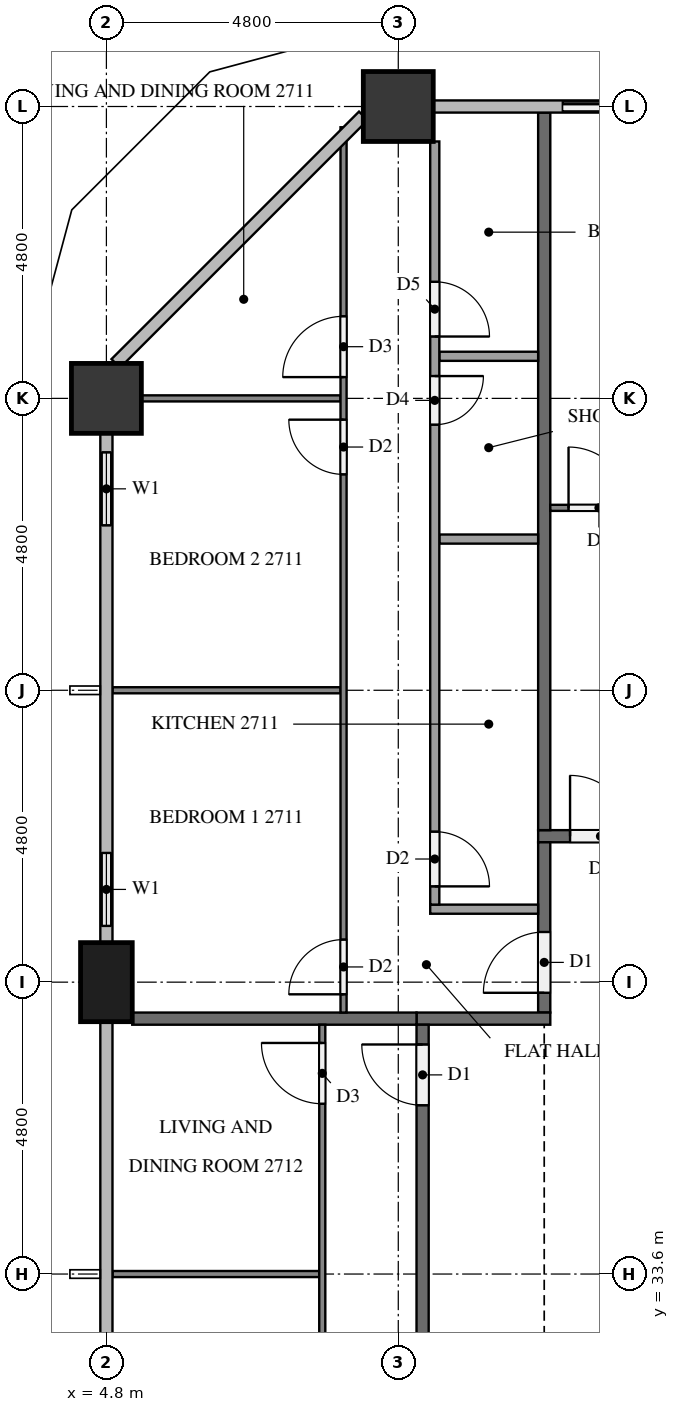
"""IFC4 building model, lengths in metres.
Left out: names, types, materials, properties, quantities, classifications, styles, units other than length and angle.
Written with IfcOpenShell. Run it as: python <this file> out.ifc"""

import sys

from ifc_helpers import new_model, si_unit, direction, frame, frame_2d, origin, origin_2d, place, context, subcontext, project, spatial, rectangle, extrude, element, fill, save


model = new_model("IFC4")
c1 = context("Model", 3, precision=1e-05, world=origin(), true_north=direction((0.0, 1.0)))
c2 = subcontext(c1, "Body", "Model", "MODEL_VIEW")
j1 = project(units=[si_unit("LENGTHUNIT", "METRE"), si_unit("PLANEANGLEUNIT", "RADIAN")], contexts=[c1])
p1 = place(None, origin())
s1 = spatial("IfcSite", under=j1, at=p1, CompositionType="ELEMENT")
p2 = place(p1, origin())
s2 = spatial("IfcBuilding", under=s1, at=p2, CompositionType="ELEMENT")
p3 = place(p2, frame((0.0, 0.0, 106.7)))
s3 = spatial("IfcBuildingStorey", under=s2, at=p3, CompositionType="ELEMENT", Elevation=106.7)
for number, where, z_axis, x_axis in (
    (1, (9.6, 52.8, 0.0), (0.0, 0.0, 1.0), (1.0, 0.0, 0.0)),
    (2, (4.8, 48.0, 0.0), (0.0, 0.0, 1.0), (1.0, 0.0, 0.0)),
):
    element("IfcColumn", number, at=place(p3, frame(where, z_axis=z_axis, x_axis=x_axis)), inside=s3, PredefinedType="COLUMN", context=c2, shape_type="SweptSolid", body=[
        extrude(rectangle(XDim=1.15, YDim=1.15, at=origin_2d()), origin(), (0.0, 0.0, 1.0), 3.2),
    ])
p4 = place(p3, frame((4.8, 38.4, 0.0), z_axis=(0.0, 0.0, 1.0), x_axis=(0.0, 1.0, 0.0)))
e3 = element("IfcColumn", 3, at=p4, inside=s3, PredefinedType="COLUMN", context=c2, shape_type="SweptSolid", body=[
    extrude(rectangle(XDim=1.3, YDim=0.85, at=origin_2d()), origin(), (0.0, 0.0, 1.0), 3.2),
])
p5 = place(p3, frame((14.4, 52.8, 0.0), z_axis=(0.0, 0.0, 1.0), x_axis=(-1.0, 0.0, 0.0)))
e4 = element("IfcWall", 4, at=p5, inside=s3, PredefinedType="SOLIDWALL", context=c2, shape_type="SweptSolid", body=[
    extrude(rectangle(XDim=2.4, YDim=0.15, at=frame_2d((1.2, 0.0))), origin(), (0.0, 0.0, 1.0), 3.2),
])
p6 = place(p5, frame((0.3, 0.0, 0.0)))
e5 = element("IfcOpeningElement", 5, at=p6, cuts=e4, PredefinedType="OPENING", context=c2, shape_type="SweptSolid", body=[
    extrude(rectangle(XDim=1.8, YDim=2.4, at=frame_2d((0.9, 1.2))), frame((0.0, 0.085, 0.0), z_axis=(0.0, -1.0, 0.0), x_axis=(1.0, 0.0, 0.0)), (0.0, 0.0, 1.0), 0.17),
])
p7 = place(p3, frame((4.8, 47.425, 0.0), z_axis=(0.0, 0.0, 1.0), x_axis=(0.0, -1.0, 0.0)))
e6 = element("IfcWall", 6, at=p7, inside=s3, PredefinedType="SOLIDWALL", context=c2, shape_type="SweptSolid", body=[
    extrude(rectangle(XDim=1.825, YDim=0.15, at=frame_2d((0.913, 0.0))), origin(), (0.0, 0.0, 1.0), 3.2),
])
p8 = place(p7, frame((0.312, 0.0, 0.9)))
e7 = element("IfcOpeningElement", 7, at=p8, cuts=e6, PredefinedType="OPENING", context=c2, shape_type="SweptSolid", body=[
    extrude(rectangle(XDim=1.2, YDim=1.4, at=frame_2d((0.6, 0.7))), frame((0.0, 0.085, 0.0), z_axis=(0.0, -1.0, 0.0), x_axis=(1.0, 0.0, 0.0)), (0.0, 0.0, 1.0), 0.17),
])
p9 = place(p3, frame((4.8, 40.8, 0.0), z_axis=(0.0, 0.0, 1.0), x_axis=(0.0, -1.0, 0.0)))
e8 = element("IfcWall", 8, at=p9, inside=s3, PredefinedType="SOLIDWALL", context=c2, shape_type="SweptSolid", body=[
    extrude(rectangle(XDim=1.75, YDim=0.15, at=frame_2d((0.875, 0.0))), origin(), (0.0, 0.0, 1.0), 3.2),
])
p10 = place(p9, frame((0.275, 0.0, 0.9)))
e9 = element("IfcOpeningElement", 9, at=p10, cuts=e8, PredefinedType="OPENING", context=c2, shape_type="SweptSolid", body=[
    extrude(rectangle(XDim=1.2, YDim=1.4, at=frame_2d((0.6, 0.7))), frame((0.0, 0.085, 0.0), z_axis=(0.0, -1.0, 0.0), x_axis=(1.0, 0.0, 0.0)), (0.0, 0.0, 1.0), 0.17),
])
p11 = place(p3, frame((11.9, 40.8, 0.0), z_axis=(0.0, 0.0, 1.0), x_axis=(1.0, 0.0, 0.0)))
e10 = element("IfcWall", 10, at=p11, inside=s3, PredefinedType="PARTITIONING", context=c2, shape_type="SweptSolid", body=[
    extrude(rectangle(XDim=38.6, YDim=0.2, at=frame_2d((19.3, 0.0))), origin(), (0.0, 0.0, 1.0), 3.2),
])
p12 = place(p11, frame((22.125, 0.0, 0.0)))
e11 = element("IfcOpeningElement", 11, at=p12, cuts=e10, PredefinedType="OPENING", context=c2, shape_type="SweptSolid", body=[
    extrude(rectangle(XDim=1.0, YDim=2.1, at=frame_2d((0.5, 1.05))), frame((0.0, 0.11, 0.0), z_axis=(0.0, -1.0, 0.0), x_axis=(1.0, 0.0, 0.0)), (0.0, 0.0, 1.0), 0.22),
])
p13 = place(p11, frame((20.275, 0.0, 0.0)))
e12 = element("IfcOpeningElement", 12, at=p13, cuts=e10, PredefinedType="OPENING", context=c2, shape_type="SweptSolid", body=[
    extrude(rectangle(XDim=1.0, YDim=2.1, at=frame_2d((0.5, 1.05))), frame((0.0, 0.11, 0.0), z_axis=(0.0, -1.0, 0.0), x_axis=(1.0, 0.0, 0.0)), (0.0, 0.0, 1.0), 0.22),
])
p14 = place(p11, frame((0.525, 0.0, 0.0)))
e13 = element("IfcOpeningElement", 13, at=p14, cuts=e10, PredefinedType="OPENING", context=c2, shape_type="SweptSolid", body=[
    extrude(rectangle(XDim=1.0, YDim=2.1, at=frame_2d((0.5, 1.05))), frame((0.0, 0.11, 0.0), z_axis=(0.0, -1.0, 0.0), x_axis=(1.0, 0.0, 0.0)), (0.0, 0.0, 1.0), 0.22),
])
p15 = place(p3, frame((12.0, 37.9, 0.0), z_axis=(0.0, 0.0, 1.0), x_axis=(0.0, 1.0, 0.0)))
e14 = element("IfcWall", 14, at=p15, inside=s3, PredefinedType="PARTITIONING", context=c2, shape_type="SweptSolid", body=[
    extrude(rectangle(XDim=2.8, YDim=0.2, at=frame_2d((1.4, 0.0))), origin(), (0.0, 0.0, 1.0), 3.2),
])
p16 = place(p15, frame((0.325, 0.0, 0.0)))
e15 = element("IfcOpeningElement", 15, at=p16, cuts=e14, PredefinedType="OPENING", context=c2, shape_type="SweptSolid", body=[
    extrude(rectangle(XDim=1.0, YDim=2.1, at=frame_2d((0.5, 1.05))), frame((0.0, 0.11, 0.0), z_axis=(0.0, -1.0, 0.0), x_axis=(1.0, 0.0, 0.0)), (0.0, 0.0, 1.0), 0.22),
])
p17 = place(p3, frame((12.1, 37.8, 0.0), z_axis=(0.0, 0.0, 1.0), x_axis=(-1.0, 0.0, 0.0)))
e16 = element("IfcWall", 16, at=p17, inside=s3, PredefinedType="PARTITIONING", context=c2, shape_type="SweptSolid", body=[
    extrude(rectangle(XDim=2.2, YDim=0.2, at=frame_2d((1.1, 0.0))), origin(), (0.0, 0.0, 1.0), 3.2),
])
p18 = place(p3, frame((10.0, 15.1, 0.0), z_axis=(0.0, 0.0, 1.0), x_axis=(0.0, 1.0, 0.0)))
e17 = element("IfcWall", 17, at=p18, inside=s3, PredefinedType="PARTITIONING", context=c2, shape_type="SweptSolid", body=[
    extrude(rectangle(XDim=22.6, YDim=0.2, at=frame_2d((11.3, 0.0))), origin(), (0.0, 0.0, 1.0), 3.2),
])
p19 = place(p18, frame((21.275, 0.0, 0.0)))
e18 = element("IfcOpeningElement", 18, at=p19, cuts=e17, PredefinedType="OPENING", context=c2, shape_type="SweptSolid", body=[
    extrude(rectangle(XDim=1.0, YDim=2.1, at=frame_2d((0.5, 1.05))), frame((0.0, 0.11, 0.0), z_axis=(0.0, -1.0, 0.0), x_axis=(1.0, 0.0, 0.0)), (0.0, 0.0, 1.0), 0.22),
])
p20 = place(p18, frame((7.475, 0.0, 0.0)))
e19 = element("IfcOpeningElement", 19, at=p20, cuts=e17, PredefinedType="OPENING", context=c2, shape_type="SweptSolid", body=[
    extrude(rectangle(XDim=1.0, YDim=2.1, at=frame_2d((0.5, 1.05))), frame((0.0, 0.11, 0.0), z_axis=(0.0, -1.0, 0.0), x_axis=(1.0, 0.0, 0.0)), (0.0, 0.0, 1.0), 0.22),
])
p21 = place(p3, frame((12.0, 52.7, 0.0), z_axis=(0.0, 0.0, 1.0), x_axis=(0.0, -1.0, 0.0)))
e20 = element("IfcWall", 20, at=p21, inside=s3, PredefinedType="PARTITIONING", context=c2, shape_type="SweptSolid", body=[
    extrude(rectangle(XDim=11.8, YDim=0.2, at=frame_2d((5.9, 0.0))), origin(), (0.0, 0.0, 1.0), 3.2),
])
p22 = place(p3, frame((5.225, 37.8, 0.0), z_axis=(0.0, 0.0, 1.0), x_axis=(1.0, 0.0, 0.0)))
e21 = element("IfcWall", 21, at=p22, inside=s3, PredefinedType="PARTITIONING", context=c2, shape_type="SweptSolid", body=[
    extrude(rectangle(XDim=4.675, YDim=0.2, at=frame_2d((2.337, 0.0))), origin(), (0.0, 0.0, 1.0), 3.2),
])
p23 = place(p3, frame((12.1, 46.2, 0.0), z_axis=(0.0, 0.0, 1.0), x_axis=(1.0, 0.0, 0.0)))
e22 = element("IfcWall", 22, at=p23, inside=s3, PredefinedType="PARTITIONING", context=c2, shape_type="SweptSolid", body=[
    extrude(rectangle(XDim=9.4, YDim=0.1, at=frame_2d((4.7, 0.0))), origin(), (0.0, 0.0, 1.0), 3.2),
])
p24 = place(p23, frame((0.3, 0.0, 0.0)))
e23 = element("IfcOpeningElement", 23, at=p24, cuts=e22, PredefinedType="OPENING", context=c2, shape_type="SweptSolid", body=[
    extrude(rectangle(XDim=1.0, YDim=2.1, at=frame_2d((0.5, 1.05))), frame((0.0, 0.06, 0.0), z_axis=(0.0, -1.0, 0.0), x_axis=(1.0, 0.0, 0.0)), (0.0, 0.0, 1.0), 0.12),
])
p25 = place(p23, frame((8.2, 0.0, 0.0)))
e24 = element("IfcOpeningElement", 24, at=p25, cuts=e22, PredefinedType="OPENING", context=c2, shape_type="SweptSolid", body=[
    extrude(rectangle(XDim=0.9, YDim=2.1, at=frame_2d((0.45, 1.05))), frame((0.0, 0.06, 0.0), z_axis=(0.0, -1.0, 0.0), x_axis=(1.0, 0.0, 0.0)), (0.0, 0.0, 1.0), 0.12),
])
p26 = place(p3, frame((8.65, 43.2, 0.0), z_axis=(0.0, 0.0, 1.0), x_axis=(-1.0, 0.0, 0.0)))
e25 = element("IfcWall", 25, at=p26, inside=s3, PredefinedType="PARTITIONING", context=c2, shape_type="SweptSolid", body=[
    extrude(rectangle(XDim=3.75, YDim=0.1, at=frame_2d((1.875, 0.0))), origin(), (0.0, 0.0, 1.0), 3.2),
])
p27 = place(p3, frame((8.65, 48.0, 0.0), z_axis=(0.0, 0.0, 1.0), x_axis=(-1.0, 0.0, 0.0)))
e26 = element("IfcWall", 26, at=p27, inside=s3, PredefinedType="PARTITIONING", context=c2, shape_type="SweptSolid", body=[
    extrude(rectangle(XDim=3.275, YDim=0.1, at=frame_2d((1.637, 0.0))), origin(), (0.0, 0.0, 1.0), 3.2),
])
p28 = place(p3, frame((8.7, 37.9, 0.0), z_axis=(0.0, 0.0, 1.0), x_axis=(0.0, 1.0, 0.0)))
e27 = element("IfcWall", 27, at=p28, inside=s3, PredefinedType="PARTITIONING", context=c2, shape_type="SweptSolid", body=[
    extrude(rectangle(XDim=14.559, YDim=0.1, at=frame_2d((7.279, 0.0))), origin(), (0.0, 0.0, 1.0), 3.2),
])
p29 = place(p28, frame((0.3, 0.0, 0.0)))
e28 = element("IfcOpeningElement", 28, at=p29, cuts=e27, PredefinedType="OPENING", context=c2, shape_type="SweptSolid", body=[
    extrude(rectangle(XDim=0.9, YDim=2.1, at=frame_2d((0.45, 1.05))), frame((0.0, 0.06, 0.0), z_axis=(0.0, -1.0, 0.0), x_axis=(1.0, 0.0, 0.0)), (0.0, 0.0, 1.0), 0.12),
])
p30 = place(p28, frame((8.85, 0.0, 0.0)))
e29 = element("IfcOpeningElement", 29, at=p30, cuts=e27, PredefinedType="OPENING", context=c2, shape_type="SweptSolid", body=[
    extrude(rectangle(XDim=0.9, YDim=2.1, at=frame_2d((0.45, 1.05))), frame((0.0, 0.06, 0.0), z_axis=(0.0, -1.0, 0.0), x_axis=(1.0, 0.0, 0.0)), (0.0, 0.0, 1.0), 0.12),
])
p31 = place(p28, frame((10.45, 0.0, 0.0)))
e30 = element("IfcOpeningElement", 30, at=p31, cuts=e27, PredefinedType="OPENING", context=c2, shape_type="SweptSolid", body=[
    extrude(rectangle(XDim=1.0, YDim=2.1, at=frame_2d((0.5, 1.05))), frame((0.0, 0.06, 0.0), z_axis=(0.0, -1.0, 0.0), x_axis=(1.0, 0.0, 0.0)), (0.0, 0.0, 1.0), 0.12),
])
for number, where, z_axis, x_axis in (
    (31, (11.9, 45.687, 0.0), (0.0, 0.0, 1.0), (-1.0, 0.0, 0.0)),
    (32, (11.9, 48.692, 0.0), (0.0, 0.0, 1.0), (-1.0, 0.0, 0.0)),
):
    element("IfcWall", number, at=place(p3, frame(where, z_axis=z_axis, x_axis=x_axis)), inside=s3, PredefinedType="PARTITIONING", context=c2, shape_type="SweptSolid", body=[
        extrude(rectangle(XDim=1.625, YDim=0.15, at=frame_2d((0.812, 0.0))), origin(), (0.0, 0.0, 1.0), 3.2),
    ])
p32 = place(p3, frame((11.9, 39.6, 0.0), z_axis=(0.0, 0.0, 1.0), x_axis=(-1.0, 0.0, 0.0)))
e33 = element("IfcWall", 33, at=p32, inside=s3, PredefinedType="PARTITIONING", context=c2, shape_type="SweptSolid", body=[
    extrude(rectangle(XDim=1.775, YDim=0.15, at=frame_2d((0.887, 0.0))), origin(), (0.0, 0.0, 1.0), 3.2),
])
p33 = place(p3, frame((10.2, 52.225, 0.0), z_axis=(0.0, 0.0, 1.0), x_axis=(0.0, -1.0, 0.0)))
e34 = element("IfcWall", 34, at=p33, inside=s3, PredefinedType="PARTITIONING", context=c2, shape_type="SweptSolid", body=[
    extrude(rectangle(XDim=12.55, YDim=0.15, at=frame_2d((6.275, 0.0))), origin(), (0.0, 0.0, 1.0), 3.2),
])
p34 = place(p33, frame((11.35, 0.0, 0.0)))
e35 = element("IfcOpeningElement", 35, at=p34, cuts=e34, PredefinedType="OPENING", context=c2, shape_type="SweptSolid", body=[
    extrude(rectangle(XDim=0.9, YDim=2.1, at=frame_2d((0.45, 1.05))), frame((0.0, 0.085, 0.0), z_axis=(0.0, -1.0, 0.0), x_axis=(1.0, 0.0, 0.0)), (0.0, 0.0, 1.0), 0.17),
])
p35 = place(p33, frame((3.858, 0.0, 0.0)))
e36 = element("IfcOpeningElement", 36, at=p35, cuts=e34, PredefinedType="OPENING", context=c2, shape_type="SweptSolid", body=[
    extrude(rectangle(XDim=0.8, YDim=2.1, at=frame_2d((0.4, 1.05))), frame((0.0, 0.085, 0.0), z_axis=(0.0, -1.0, 0.0), x_axis=(1.0, 0.0, 0.0)), (0.0, 0.0, 1.0), 0.17),
])
p36 = place(p33, frame((2.308, 0.0, 0.0)))
e37 = element("IfcOpeningElement", 37, at=p36, cuts=e34, PredefinedType="OPENING", context=c2, shape_type="SweptSolid", body=[
    extrude(rectangle(XDim=0.9, YDim=2.1, at=frame_2d((0.45, 1.05))), frame((0.0, 0.085, 0.0), z_axis=(0.0, -1.0, 0.0), x_axis=(1.0, 0.0, 0.0)), (0.0, 0.0, 1.0), 0.17),
])
p37 = place(p3, frame((8.3, 33.6, 0.0), z_axis=(0.0, 0.0, 1.0), x_axis=(-1.0, 0.0, 0.0)))
e38 = element("IfcWall", 38, at=p37, inside=s3, PredefinedType="PARTITIONING", context=c2, shape_type="SweptSolid", body=[
    extrude(rectangle(XDim=3.4, YDim=0.1, at=frame_2d((1.7, 0.0))), origin(), (0.0, 0.0, 1.0), 3.2),
])
p38 = place(p3, frame((8.35, 24.1, 0.0), z_axis=(0.0, 0.0, 1.0), x_axis=(0.0, 1.0, 0.0)))
e39 = element("IfcWall", 39, at=p38, inside=s3, PredefinedType="PARTITIONING", context=c2, shape_type="SweptSolid", body=[
    extrude(rectangle(XDim=13.6, YDim=0.1, at=frame_2d((6.8, 0.0))), origin(), (0.0, 0.0, 1.0), 3.2),
])
p39 = place(p38, frame((12.3, 0.0, 0.0)))
e40 = element("IfcOpeningElement", 40, at=p39, cuts=e39, PredefinedType="OPENING", context=c2, shape_type="SweptSolid", body=[
    extrude(rectangle(XDim=1.0, YDim=2.1, at=frame_2d((0.5, 1.05))), frame((0.0, 0.06, 0.0), z_axis=(0.0, -1.0, 0.0), x_axis=(1.0, 0.0, 0.0)), (0.0, 0.0, 1.0), 0.12),
])
p40 = place(p38, frame((5.05, 0.0, 0.0)))
e41 = element("IfcOpeningElement", 41, at=p40, cuts=e39, PredefinedType="OPENING", context=c2, shape_type="SweptSolid", body=[
    extrude(rectangle(XDim=0.9, YDim=2.1, at=frame_2d((0.45, 1.05))), frame((0.0, 0.06, 0.0), z_axis=(0.0, -1.0, 0.0), x_axis=(1.0, 0.0, 0.0)), (0.0, 0.0, 1.0), 0.12),
])
p41 = place(p38, frame((3.55, 0.0, 0.0)))
e42 = element("IfcOpeningElement", 42, at=p41, cuts=e39, PredefinedType="OPENING", context=c2, shape_type="SweptSolid", body=[
    extrude(rectangle(XDim=0.8, YDim=2.1, at=frame_2d((0.4, 1.05))), frame((0.0, 0.06, 0.0), z_axis=(0.0, -1.0, 0.0), x_axis=(1.0, 0.0, 0.0)), (0.0, 0.0, 1.0), 0.12),
])
p42 = place(p38, frame((0.3, 0.0, 0.0)))
e43 = element("IfcOpeningElement", 43, at=p42, cuts=e39, PredefinedType="OPENING", context=c2, shape_type="SweptSolid", body=[
    extrude(rectangle(XDim=0.9, YDim=2.1, at=frame_2d((0.45, 1.05))), frame((0.0, 0.06, 0.0), z_axis=(0.0, -1.0, 0.0), x_axis=(1.0, 0.0, 0.0)), (0.0, 0.0, 1.0), 0.12),
])
p43 = place(p6, origin())
e44 = element("IfcDoor", 44, at=p43, inside=s3, OperationType="SLIDING_TO_RIGHT", PredefinedType="DOOR", context=c2, shape_type="SweptSolid", body=[
    extrude(rectangle(XDim=1.8, YDim=2.4, at=frame_2d((0.9, 1.2))), frame((0.0, 0.025, 0.0), z_axis=(0.0, -1.0, 0.0), x_axis=(1.0, 0.0, 0.0)), (0.0, 0.0, 1.0), 0.05),
])
fill(e5, e44)
p44 = place(p8, origin())
e45 = element("IfcWindow", 45, at=p44, inside=s3, PartitioningType="SINGLE_PANEL", PredefinedType="WINDOW", context=c2, shape_type="SweptSolid", body=[
    extrude(rectangle(XDim=1.2, YDim=1.4, at=frame_2d((0.6, 0.7))), frame((0.0, 0.03, 0.0), z_axis=(0.0, -1.0, 0.0), x_axis=(1.0, 0.0, 0.0)), (0.0, 0.0, 1.0), 0.06),
])
fill(e7, e45)
p45 = place(p10, origin())
e46 = element("IfcWindow", 46, at=p45, inside=s3, PartitioningType="SINGLE_PANEL", PredefinedType="WINDOW", context=c2, shape_type="SweptSolid", body=[
    extrude(rectangle(XDim=1.2, YDim=1.4, at=frame_2d((0.6, 0.7))), frame((0.0, 0.03, 0.0), z_axis=(0.0, -1.0, 0.0), x_axis=(1.0, 0.0, 0.0)), (0.0, 0.0, 1.0), 0.06),
])
fill(e9, e46)
p46 = place(p14, origin())
e47 = element("IfcDoor", 47, at=p46, inside=s3, OperationType="SINGLE_SWING_LEFT", PredefinedType="DOOR", context=c2, shape_type="SweptSolid", body=[
    extrude(rectangle(XDim=1.0, YDim=2.1, at=frame_2d((0.5, 1.05))), frame((0.0, 0.025, 0.0), z_axis=(0.0, -1.0, 0.0), x_axis=(1.0, 0.0, 0.0)), (0.0, 0.0, 1.0), 0.05),
])
fill(e13, e47)
p47 = place(p16, origin())
e48 = element("IfcDoor", 48, at=p47, inside=s3, OperationType="SINGLE_SWING_LEFT", PredefinedType="DOOR", context=c2, shape_type="SweptSolid", body=[
    extrude(rectangle(XDim=1.0, YDim=2.1, at=frame_2d((0.5, 1.05))), frame((0.0, 0.025, 0.0), z_axis=(0.0, -1.0, 0.0), x_axis=(1.0, 0.0, 0.0)), (0.0, 0.0, 1.0), 0.05),
])
fill(e15, e48)
p48 = place(p19, origin())
e49 = element("IfcDoor", 49, at=p48, inside=s3, OperationType="SINGLE_SWING_RIGHT", PredefinedType="DOOR", context=c2, shape_type="SweptSolid", body=[
    extrude(rectangle(XDim=1.0, YDim=2.1, at=frame_2d((0.5, 1.05))), frame((0.0, 0.025, 0.0), z_axis=(0.0, -1.0, 0.0), x_axis=(1.0, 0.0, 0.0)), (0.0, 0.0, 1.0), 0.05),
])
fill(e18, e49)
p49 = place(p24, origin())
e50 = element("IfcDoor", 50, at=p49, inside=s3, OperationType="SINGLE_SWING_LEFT", PredefinedType="DOOR", context=c2, shape_type="SweptSolid", body=[
    extrude(rectangle(XDim=1.0, YDim=2.1, at=frame_2d((0.5, 1.05))), frame((0.0, 0.025, 0.0), z_axis=(0.0, -1.0, 0.0), x_axis=(1.0, 0.0, 0.0)), (0.0, 0.0, 1.0), 0.05),
])
fill(e23, e50)
p50 = place(p29, origin())
e51 = element("IfcDoor", 51, at=p50, inside=s3, OperationType="SINGLE_SWING_LEFT", PredefinedType="DOOR", context=c2, shape_type="SweptSolid", body=[
    extrude(rectangle(XDim=0.9, YDim=2.1, at=frame_2d((0.45, 1.05))), frame((0.0, 0.025, 0.0), z_axis=(0.0, -1.0, 0.0), x_axis=(1.0, 0.0, 0.0)), (0.0, 0.0, 1.0), 0.05),
])
fill(e28, e51)
p51 = place(p30, origin())
e52 = element("IfcDoor", 52, at=p51, inside=s3, OperationType="SINGLE_SWING_RIGHT", PredefinedType="DOOR", context=c2, shape_type="SweptSolid", body=[
    extrude(rectangle(XDim=0.9, YDim=2.1, at=frame_2d((0.45, 1.05))), frame((0.0, 0.025, 0.0), z_axis=(0.0, -1.0, 0.0), x_axis=(1.0, 0.0, 0.0)), (0.0, 0.0, 1.0), 0.05),
])
fill(e29, e52)
p52 = place(p31, origin())
e53 = element("IfcDoor", 53, at=p52, inside=s3, OperationType="SINGLE_SWING_LEFT", PredefinedType="DOOR", context=c2, shape_type="SweptSolid", body=[
    extrude(rectangle(XDim=1.0, YDim=2.1, at=frame_2d((0.5, 1.05))), frame((0.0, 0.025, 0.0), z_axis=(0.0, -1.0, 0.0), x_axis=(1.0, 0.0, 0.0)), (0.0, 0.0, 1.0), 0.05),
])
fill(e30, e53)
p53 = place(p34, origin())
e54 = element("IfcDoor", 54, at=p53, inside=s3, OperationType="SINGLE_SWING_RIGHT", PredefinedType="DOOR", context=c2, shape_type="SweptSolid", body=[
    extrude(rectangle(XDim=0.9, YDim=2.1, at=frame_2d((0.45, 1.05))), frame((0.0, 0.025, 0.0), z_axis=(0.0, -1.0, 0.0), x_axis=(1.0, 0.0, 0.0)), (0.0, 0.0, 1.0), 0.05),
])
fill(e35, e54)
p54 = place(p35, origin())
e55 = element("IfcDoor", 55, at=p54, inside=s3, OperationType="SINGLE_SWING_LEFT", PredefinedType="DOOR", context=c2, shape_type="SweptSolid", body=[
    extrude(rectangle(XDim=0.8, YDim=2.1, at=frame_2d((0.4, 1.05))), frame((0.0, 0.025, 0.0), z_axis=(0.0, -1.0, 0.0), x_axis=(1.0, 0.0, 0.0)), (0.0, 0.0, 1.0), 0.05),
])
fill(e36, e55)
p55 = place(p36, origin())
e56 = element("IfcDoor", 56, at=p55, inside=s3, OperationType="SINGLE_SWING_RIGHT", PredefinedType="DOOR", context=c2, shape_type="SweptSolid", body=[
    extrude(rectangle(XDim=0.9, YDim=2.1, at=frame_2d((0.45, 1.05))), frame((0.0, 0.025, 0.0), z_axis=(0.0, -1.0, 0.0), x_axis=(1.0, 0.0, 0.0)), (0.0, 0.0, 1.0), 0.05),
])
fill(e37, e56)
p56 = place(p39, origin())
e57 = element("IfcDoor", 57, at=p56, inside=s3, OperationType="SINGLE_SWING_RIGHT", PredefinedType="DOOR", context=c2, shape_type="SweptSolid", body=[
    extrude(rectangle(XDim=1.0, YDim=2.1, at=frame_2d((0.5, 1.05))), frame((0.0, 0.025, 0.0), z_axis=(0.0, -1.0, 0.0), x_axis=(1.0, 0.0, 0.0)), (0.0, 0.0, 1.0), 0.05),
])
fill(e40, e57)
save(model, sys.argv[1])
